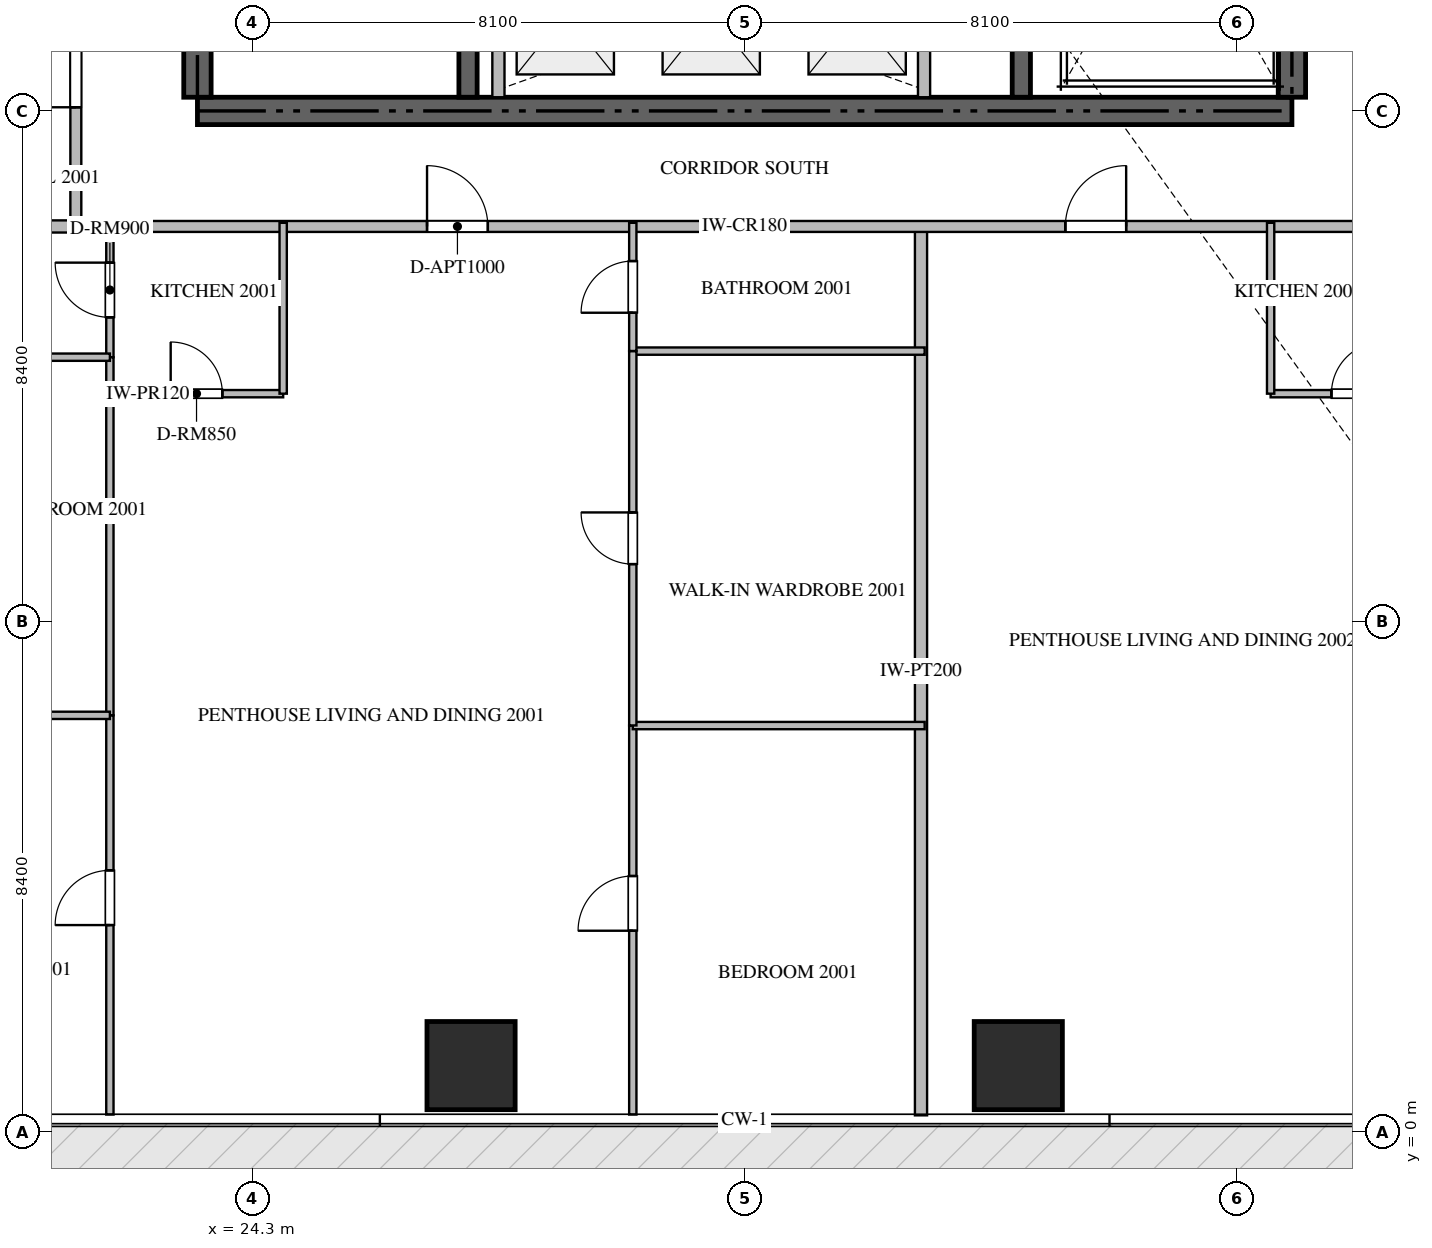
"""IFC4 building model, lengths in metres.
Left out: names, types, materials, properties, quantities, classifications, styles, units other than length and angle.
Written with IfcOpenShell. Run it as: python <this file> out.ifc"""

import sys

from ifc_helpers import new_model, si_unit, direction, frame, frame_2d, origin, origin_2d, place, context, subcontext, project, spatial, rectangle, extrude, source, transform, mapped, element, fill, save


model = new_model("IFC4")
c1 = context("Model", 3, precision=1e-05, world=origin(), true_north=direction((0.0, 1.0)))
c2 = subcontext(c1, "Body", "Model", "MODEL_VIEW")
j1 = project(units=[si_unit("LENGTHUNIT", "METRE"), si_unit("PLANEANGLEUNIT", "RADIAN")], contexts=[c1])
p1 = place(None, origin())
s1 = spatial("IfcSite", under=j1, at=p1, CompositionType="ELEMENT")
p2 = place(p1, origin())
s2 = spatial("IfcBuilding", under=s1, at=p2, CompositionType="ELEMENT")
p3 = place(p2, frame((0.0, 0.0, 82.95)))
s3 = spatial("IfcBuildingStorey", under=s2, at=p3, CompositionType="ELEMENT", Elevation=82.95)
p4 = place(p3, frame((23.4, 16.8, -0.26), z_axis=(0.0, 0.0, 1.0), x_axis=(1.0, 0.0, 0.0)))
e1 = element("IfcWall", 1, at=p4, inside=s3, PredefinedType="SHEAR", context=c2, shape_type="SweptSolid", body=[
    extrude(rectangle(XDim=18.0, YDim=0.45, at=frame_2d((9.0, 0.0))), origin(), (0.0, 0.0, 1.0), 3.748),
])
p5 = place(p3, frame((23.4, 17.025, -0.26), z_axis=(0.0, 0.0, 1.0), x_axis=(0.0, 1.0, 0.0)))
e2 = element("IfcWall", 2, at=p5, inside=s3, PredefinedType="SHEAR", context=c2, shape_type="SweptSolid", body=[
    extrude(rectangle(XDim=4.825, YDim=0.45, at=frame_2d((2.413, 0.0))), origin(), (0.0, 0.0, 1.0), 3.748),
])
p6 = place(p3, frame((41.4, 17.025, -0.26), z_axis=(0.0, 0.0, 1.0), x_axis=(0.0, 1.0, 0.0)))
e3 = element("IfcWall", 3, at=p6, inside=s3, PredefinedType="SHEAR", context=c2, shape_type="SweptSolid", body=[
    extrude(rectangle(XDim=8.325, YDim=0.45, at=frame_2d((4.163, 0.0))), origin(), (0.0, 0.0, 1.0), 3.748),
])
p7 = place(p3, frame((27.85, 17.025, -0.26), z_axis=(0.0, 0.0, 1.0), x_axis=(0.0, 1.0, 0.0)))
e4 = element("IfcWall", 4, at=p7, inside=s3, PredefinedType="SHEAR", context=c2, shape_type="SweptSolid", body=[
    extrude(rectangle(XDim=4.825, YDim=0.3, at=frame_2d((2.413, 0.0))), origin(), (0.0, 0.0, 1.0), 3.748),
])
p8 = place(p3, frame((36.95, 17.025, -0.26), z_axis=(0.0, 0.0, 1.0), x_axis=(0.0, 1.0, 0.0)))
e5 = element("IfcWall", 5, at=p8, inside=s3, PredefinedType="SHEAR", context=c2, shape_type="SweptSolid", body=[
    extrude(rectangle(XDim=8.325, YDim=0.3, at=frame_2d((4.163, 0.0))), origin(), (0.0, 0.0, 1.0), 3.748),
])
m1 = source(origin(), c2, "Body", "SweptSolid", [
    extrude(rectangle(XDim=1.45, YDim=1.45, at=origin_2d()), origin(), (0.0, 0.0, 1.0), 3.75),
])
for number, where, z_axis, x_axis in (
    (6, (27.9, 1.1, -0.26), (0.0, 0.0, 1.0), (1.0, 0.0, 0.0)),
    (7, (36.9, 1.1, -0.26), (0.0, 0.0, 1.0), (1.0, 0.0, 0.0)),
):
    element("IfcColumn", number, at=place(p3, frame(where, z_axis=z_axis, x_axis=x_axis)), inside=s3, PredefinedType="COLUMN", context=c2, shape_type="MappedRepresentation", body=[
        mapped(m1, transform((0.0, 0.0, 0.0), scale=1.0)),
    ])
for number, where, z_axis, x_axis in (
    (8, (28.35, 17.025, 0.0), (0.0, 0.0, 1.0), (0.0, 1.0, 0.0)),
    (9, (35.35, 17.025, 0.0), (0.0, 0.0, 1.0), (0.0, 1.0, 0.0)),
):
    element("IfcWall", number, at=place(p3, frame(where, z_axis=z_axis, x_axis=x_axis)), inside=s3, PredefinedType="STANDARD", context=c2, shape_type="SweptSolid", body=[
        extrude(rectangle(XDim=2.525, YDim=0.2, at=frame_2d((1.263, 0.0))), origin(), (0.0, 0.0, 1.0), 3.49),
    ])
p9 = place(p3, frame((35.3, 0.282, 0.0), z_axis=(0.0, 0.0, 1.0), x_axis=(0.0, 1.0, 0.0)))
e10 = element("IfcWall", 10, at=p9, inside=s3, PredefinedType="PARTITIONING", context=c2, shape_type="SweptSolid", body=[
    extrude(rectangle(XDim=14.618, YDim=0.2, at=frame_2d((7.309, 0.0))), origin(), (0.0, 0.0, 1.0), 3.49),
])
p10 = place(p3, frame((6.082, 14.9, 0.0), z_axis=(0.0, 0.0, 1.0), x_axis=(1.0, 0.0, 0.0)))
e11 = element("IfcWall", 11, at=p10, inside=s3, PredefinedType="PARTITIONING", context=c2, shape_type="SweptSolid", body=[
    extrude(rectangle(XDim=15.318, YDim=0.2, at=frame_2d((7.659, 0.0))), origin(), (0.0, 0.0, 1.0), 3.49),
])
p11 = place(p3, frame((21.402, 14.9, 0.0), z_axis=(0.0, 0.0, 1.0), x_axis=(1.0, 0.0, 0.0)))
e12 = element("IfcWall", 12, at=p11, inside=s3, PredefinedType="PARTITIONING", context=c2, shape_type="SweptSolid", body=[
    extrude(rectangle(XDim=21.996, YDim=0.18, at=frame_2d((10.998, 0.0))), origin(), (0.0, 0.0, 1.0), 3.49),
])
p12 = place(p11, frame((5.774, 0.0, 0.0)))
e13 = element("IfcOpeningElement", 13, at=p12, cuts=e12, PredefinedType="OPENING", context=c2, shape_type="SweptSolid", body=[
    extrude(rectangle(XDim=1.0, YDim=2.15, at=frame_2d((0.5, 1.075))), frame((0.0, 0.1, 0.0), z_axis=(0.0, -1.0, 0.0), x_axis=(1.0, 0.0, 0.0)), (0.0, 0.0, 1.0), 0.2),
])
p13 = place(p11, frame((16.272, 0.0, 0.0)))
e14 = element("IfcOpeningElement", 14, at=p13, cuts=e12, PredefinedType="OPENING", context=c2, shape_type="SweptSolid", body=[
    extrude(rectangle(XDim=1.0, YDim=2.15, at=frame_2d((0.5, 1.075))), frame((0.0, 0.1, 0.0), z_axis=(0.0, -1.0, 0.0), x_axis=(1.0, 0.0, 0.0)), (0.0, 0.0, 1.0), 0.2),
])
p14 = place(p3, frame((21.4, 14.9, 0.0), z_axis=(0.0, 0.0, 1.0), x_axis=(0.0, 1.0, 0.0)))
e15 = element("IfcWall", 15, at=p14, inside=s3, PredefinedType="PARTITIONING", context=c2, shape_type="SweptSolid", body=[
    extrude(rectangle(XDim=20.6, YDim=0.18, at=frame_2d((10.3, 0.0))), origin(), (0.0, 0.0, 1.0), 3.49),
])
p15 = place(p14, frame((1.96, 0.0, 0.0)))
e16 = element("IfcOpeningElement", 16, at=p15, cuts=e15, PredefinedType="OPENING", context=c2, shape_type="SweptSolid", body=[
    extrude(rectangle(XDim=1.0, YDim=2.15, at=frame_2d((0.5, 1.075))), frame((0.0, 0.1, 0.0), z_axis=(0.0, -1.0, 0.0), x_axis=(1.0, 0.0, 0.0)), (0.0, 0.0, 1.0), 0.2),
])
p16 = place(p3, frame((21.96, 12.15, 0.0), z_axis=(0.0, 0.0, 1.0), x_axis=(1.0, 0.0, 0.0)))
e17 = element("IfcWall", 17, at=p16, inside=s3, PredefinedType="PARTITIONING", context=c2, shape_type="SweptSolid", body=[
    extrude(rectangle(XDim=2.85, YDim=0.12, at=frame_2d((1.425, 0.0))), origin(), (0.0, 0.0, 1.0), 3.49),
])
p17 = place(p16, frame((1.0, 0.0, 0.0)))
e18 = element("IfcOpeningElement", 18, at=p17, cuts=e17, PredefinedType="OPENING", context=c2, shape_type="SweptSolid", body=[
    extrude(rectangle(XDim=0.85, YDim=2.1, at=frame_2d((0.425, 1.05))), frame((0.0, 0.07, 0.0), z_axis=(0.0, -1.0, 0.0), x_axis=(1.0, 0.0, 0.0)), (0.0, 0.0, 1.0), 0.14),
])
p18 = place(p3, frame((24.81, 12.15, 0.0), z_axis=(0.0, 0.0, 1.0), x_axis=(0.0, 1.0, 0.0)))
e19 = element("IfcWall", 19, at=p18, inside=s3, PredefinedType="PARTITIONING", context=c2, shape_type="SweptSolid", body=[
    extrude(rectangle(XDim=2.81, YDim=0.12, at=frame_2d((1.405, 0.0))), origin(), (0.0, 0.0, 1.0), 3.49),
])
p19 = place(p3, frame((21.96, 12.75, 0.0), z_axis=(0.0, 0.0, 1.0), x_axis=(0.0, 1.0, 0.0)))
e20 = element("IfcWall", 20, at=p19, inside=s3, PredefinedType="PARTITIONING", context=c2, shape_type="SweptSolid", body=[
    extrude(rectangle(XDim=2.21, YDim=0.12, at=frame_2d((1.105, 0.0))), origin(), (0.0, 0.0, 1.0), 3.49),
])
p20 = place(p19, frame((0.655, 0.0, 0.0)))
e21 = element("IfcOpeningElement", 21, at=p20, cuts=e20, PredefinedType="OPENING", context=c2, shape_type="SweptSolid", body=[
    extrude(rectangle(XDim=0.9, YDim=2.1, at=frame_2d((0.45, 1.05))), frame((0.0, 0.07, 0.0), z_axis=(0.0, -1.0, 0.0), x_axis=(1.0, 0.0, 0.0)), (0.0, 0.0, 1.0), 0.14),
])
p21 = place(p3, frame((21.96, 0.295, 0.0), z_axis=(0.0, 0.0, 1.0), x_axis=(0.0, 1.0, 0.0)))
e22 = element("IfcWall", 22, at=p21, inside=s3, PredefinedType="PARTITIONING", context=c2, shape_type="SweptSolid", body=[
    extrude(rectangle(XDim=6.565, YDim=0.12, at=frame_2d((3.283, 0.0))), origin(), (0.0, 0.0, 1.0), 3.49),
])
p22 = place(p21, frame((3.116, 0.0, 0.0)))
e23 = element("IfcOpeningElement", 23, at=p22, cuts=e22, PredefinedType="OPENING", context=c2, shape_type="SweptSolid", body=[
    extrude(rectangle(XDim=0.9, YDim=2.1, at=frame_2d((0.45, 1.05))), frame((0.0, 0.07, 0.0), z_axis=(0.0, -1.0, 0.0), x_axis=(1.0, 0.0, 0.0)), (0.0, 0.0, 1.0), 0.14),
])
p23 = place(p3, frame((21.96, 6.862, 0.0), z_axis=(0.0, 0.0, 1.0), x_axis=(0.0, 1.0, 0.0)))
e24 = element("IfcWall", 24, at=p23, inside=s3, PredefinedType="PARTITIONING", context=c2, shape_type="SweptSolid", body=[
    extrude(rectangle(XDim=5.886, YDim=0.12, at=frame_2d((2.943, 0.0))), origin(), (0.0, 0.0, 1.0), 3.49),
])
p24 = place(p3, frame((16.81, 6.86, 0.0), z_axis=(0.0, 0.0, 1.0), x_axis=(1.0, 0.0, 0.0)))
e25 = element("IfcWall", 25, at=p24, inside=s3, PredefinedType="PARTITIONING", context=c2, shape_type="SweptSolid", body=[
    extrude(rectangle(XDim=5.15, YDim=0.12, at=frame_2d((2.575, 0.0))), origin(), (0.0, 0.0, 1.0), 3.49),
])
p25 = place(p3, frame((18.912, 12.75, 0.0), z_axis=(0.0, 0.0, 1.0), x_axis=(1.0, 0.0, 0.0)))
e26 = element("IfcWall", 26, at=p25, inside=s3, PredefinedType="PARTITIONING", context=c2, shape_type="SweptSolid", body=[
    extrude(rectangle(XDim=3.048, YDim=0.12, at=frame_2d((1.524, 0.0))), origin(), (0.0, 0.0, 1.0), 3.49),
])
p26 = place(p25, frame((1.099, 0.0, 0.0)))
e27 = element("IfcOpeningElement", 27, at=p26, cuts=e26, PredefinedType="OPENING", context=c2, shape_type="SweptSolid", body=[
    extrude(rectangle(XDim=0.85, YDim=2.1, at=frame_2d((0.425, 1.05))), frame((0.0, 0.07, 0.0), z_axis=(0.0, -1.0, 0.0), x_axis=(1.0, 0.0, 0.0)), (0.0, 0.0, 1.0), 0.14),
])
p27 = place(p3, frame((30.56, 0.295, 0.0), z_axis=(0.0, 0.0, 1.0), x_axis=(0.0, 1.0, 0.0)))
e28 = element("IfcWall", 28, at=p27, inside=s3, PredefinedType="PARTITIONING", context=c2, shape_type="SweptSolid", body=[
    extrude(rectangle(XDim=6.397, YDim=0.12, at=frame_2d((3.198, 0.0))), origin(), (0.0, 0.0, 1.0), 3.49),
])
p28 = place(p27, frame((3.023, 0.0, 0.0)))
e29 = element("IfcOpeningElement", 29, at=p28, cuts=e28, PredefinedType="OPENING", context=c2, shape_type="SweptSolid", body=[
    extrude(rectangle(XDim=0.9, YDim=2.1, at=frame_2d((0.45, 1.05))), frame((0.0, 0.07, 0.0), z_axis=(0.0, -1.0, 0.0), x_axis=(1.0, 0.0, 0.0)), (0.0, 0.0, 1.0), 0.14),
])
for number, where, z_axis, x_axis in (
    (30, (30.56, 6.692, 0.0), (0.0, 0.0, 1.0), (1.0, 0.0, 0.0)),
    (31, (30.56, 12.85, 0.0), (0.0, 0.0, 1.0), (1.0, 0.0, 0.0)),
):
    element("IfcWall", number, at=place(p3, frame(where, z_axis=z_axis, x_axis=x_axis)), inside=s3, PredefinedType="PARTITIONING", context=c2, shape_type="SweptSolid", body=[
        extrude(rectangle(XDim=4.8, YDim=0.12, at=frame_2d((2.4, 0.0))), origin(), (0.0, 0.0, 1.0), 3.49),
    ])
p29 = place(p3, frame((30.56, 6.694, 0.0), z_axis=(0.0, 0.0, 1.0), x_axis=(0.0, 1.0, 0.0)))
e32 = element("IfcWall", 32, at=p29, inside=s3, PredefinedType="PARTITIONING", context=c2, shape_type="SweptSolid", body=[
    extrude(rectangle(XDim=6.156, YDim=0.12, at=frame_2d((3.078, 0.0))), origin(), (0.0, 0.0, 1.0), 3.49),
])
p30 = place(p29, frame((2.653, 0.0, 0.0)))
e33 = element("IfcOpeningElement", 33, at=p30, cuts=e32, PredefinedType="OPENING", context=c2, shape_type="SweptSolid", body=[
    extrude(rectangle(XDim=0.85, YDim=2.1, at=frame_2d((0.425, 1.05))), frame((0.0, 0.07, 0.0), z_axis=(0.0, -1.0, 0.0), x_axis=(1.0, 0.0, 0.0)), (0.0, 0.0, 1.0), 0.14),
])
p31 = place(p3, frame((30.56, 12.852, 0.0), z_axis=(0.0, 0.0, 1.0), x_axis=(0.0, 1.0, 0.0)))
e34 = element("IfcWall", 34, at=p31, inside=s3, PredefinedType="PARTITIONING", context=c2, shape_type="SweptSolid", body=[
    extrude(rectangle(XDim=2.108, YDim=0.12, at=frame_2d((1.054, 0.0))), origin(), (0.0, 0.0, 1.0), 3.49),
])
p32 = place(p31, frame((0.629, 0.0, 0.0)))
e35 = element("IfcOpeningElement", 35, at=p32, cuts=e34, PredefinedType="OPENING", context=c2, shape_type="SweptSolid", body=[
    extrude(rectangle(XDim=0.85, YDim=2.1, at=frame_2d((0.425, 1.05))), frame((0.0, 0.07, 0.0), z_axis=(0.0, -1.0, 0.0), x_axis=(1.0, 0.0, 0.0)), (0.0, 0.0, 1.0), 0.14),
])
p33 = place(p3, frame((41.05, 12.15, 0.0), z_axis=(0.0, 0.0, 1.0), x_axis=(1.0, 0.0, 0.0)))
e36 = element("IfcWall", 36, at=p33, inside=s3, PredefinedType="PARTITIONING", context=c2, shape_type="SweptSolid", body=[
    extrude(rectangle(XDim=2.85, YDim=0.12, at=frame_2d((1.425, 0.0))), origin(), (0.0, 0.0, 1.0), 3.49),
])
p34 = place(p33, frame((1.0, 0.0, 0.0)))
e37 = element("IfcOpeningElement", 37, at=p34, cuts=e36, PredefinedType="OPENING", context=c2, shape_type="SweptSolid", body=[
    extrude(rectangle(XDim=0.85, YDim=2.1, at=frame_2d((0.425, 1.05))), frame((0.0, 0.07, 0.0), z_axis=(0.0, -1.0, 0.0), x_axis=(1.0, 0.0, 0.0)), (0.0, 0.0, 1.0), 0.14),
])
p35 = place(p3, frame((41.05, 12.15, 0.0), z_axis=(0.0, 0.0, 1.0), x_axis=(0.0, 1.0, 0.0)))
e38 = element("IfcWall", 38, at=p35, inside=s3, PredefinedType="PARTITIONING", context=c2, shape_type="SweptSolid", body=[
    extrude(rectangle(XDim=2.81, YDim=0.12, at=frame_2d((1.405, 0.0))), origin(), (0.0, 0.0, 1.0), 3.49),
])
m2 = source(origin(), c2, "Body", "SweptSolid", [
    extrude(rectangle(XDim=1.0, YDim=2.15, at=frame_2d((0.5, 1.075))), frame((0.0, 0.025, 0.0), z_axis=(0.0, -1.0, 0.0), x_axis=(1.0, 0.0, 0.0)), (0.0, 0.0, 1.0), 0.05),
])
p36 = place(p12, origin())
e39 = element("IfcDoor", 39, at=p36, inside=s3, OperationType="SINGLE_SWING_LEFT", PredefinedType="DOOR", context=c2, shape_type="MappedRepresentation", body=[
    mapped(m2, transform((0.0, 0.0, 0.0), scale=1.0)),
])
fill(e13, e39)
p37 = place(p13, origin())
e40 = element("IfcDoor", 40, at=p37, inside=s3, OperationType="SINGLE_SWING_RIGHT", PredefinedType="DOOR", context=c2, shape_type="MappedRepresentation", body=[
    mapped(m2, transform((0.0, 0.0, 0.0), scale=1.0)),
])
fill(e14, e40)
p38 = place(p15, origin())
e41 = element("IfcDoor", 41, at=p38, inside=s3, OperationType="SINGLE_SWING_LEFT", PredefinedType="DOOR", context=c2, shape_type="MappedRepresentation", body=[
    mapped(m2, transform((0.0, 0.0, 0.0), scale=1.0)),
])
fill(e16, e41)
m3 = source(origin(), c2, "Body", "SweptSolid", [
    extrude(rectangle(XDim=0.85, YDim=2.1, at=frame_2d((0.425, 1.05))), frame((0.0, 0.025, 0.0), z_axis=(0.0, -1.0, 0.0), x_axis=(1.0, 0.0, 0.0)), (0.0, 0.0, 1.0), 0.05),
])
p39 = place(p17, origin())
e42 = element("IfcDoor", 42, at=p39, inside=s3, OperationType="SINGLE_SWING_LEFT", PredefinedType="DOOR", context=c2, shape_type="MappedRepresentation", body=[
    mapped(m3, transform((0.0, 0.0, 0.0), scale=1.0)),
])
fill(e18, e42)
m4 = source(origin(), c2, "Body", "SweptSolid", [
    extrude(rectangle(XDim=0.9, YDim=2.1, at=frame_2d((0.45, 1.05))), frame((0.0, 0.025, 0.0), z_axis=(0.0, -1.0, 0.0), x_axis=(1.0, 0.0, 0.0)), (0.0, 0.0, 1.0), 0.05),
])
p40 = place(p20, origin())
e43 = element("IfcDoor", 43, at=p40, inside=s3, OperationType="SINGLE_SWING_RIGHT", PredefinedType="DOOR", context=c2, shape_type="MappedRepresentation", body=[
    mapped(m4, transform((0.0, 0.0, 0.0), scale=1.0)),
])
fill(e21, e43)
p41 = place(p22, origin())
e44 = element("IfcDoor", 44, at=p41, inside=s3, OperationType="SINGLE_SWING_LEFT", PredefinedType="DOOR", context=c2, shape_type="MappedRepresentation", body=[
    mapped(m4, transform((0.0, 0.0, 0.0), scale=1.0)),
])
fill(e23, e44)
p42 = place(p28, origin())
e45 = element("IfcDoor", 45, at=p42, inside=s3, OperationType="SINGLE_SWING_LEFT", PredefinedType="DOOR", context=c2, shape_type="MappedRepresentation", body=[
    mapped(m4, transform((0.0, 0.0, 0.0), scale=1.0)),
])
fill(e29, e45)
p43 = place(p30, origin())
e46 = element("IfcDoor", 46, at=p43, inside=s3, OperationType="SINGLE_SWING_RIGHT", PredefinedType="DOOR", context=c2, shape_type="MappedRepresentation", body=[
    mapped(m3, transform((0.0, 0.0, 0.0), scale=1.0)),
])
fill(e33, e46)
p44 = place(p32, origin())
e47 = element("IfcDoor", 47, at=p44, inside=s3, OperationType="SINGLE_SWING_LEFT", PredefinedType="DOOR", context=c2, shape_type="MappedRepresentation", body=[
    mapped(m3, transform((0.0, 0.0, 0.0), scale=1.0)),
])
fill(e35, e47)
p45 = place(p34, origin())
e48 = element("IfcDoor", 48, at=p45, inside=s3, OperationType="SINGLE_SWING_RIGHT", PredefinedType="DOOR", context=c2, shape_type="MappedRepresentation", body=[
    mapped(m3, transform((0.0, 0.0, 0.0), scale=1.0)),
])
fill(e37, e48)
save(model, sys.argv[1])
